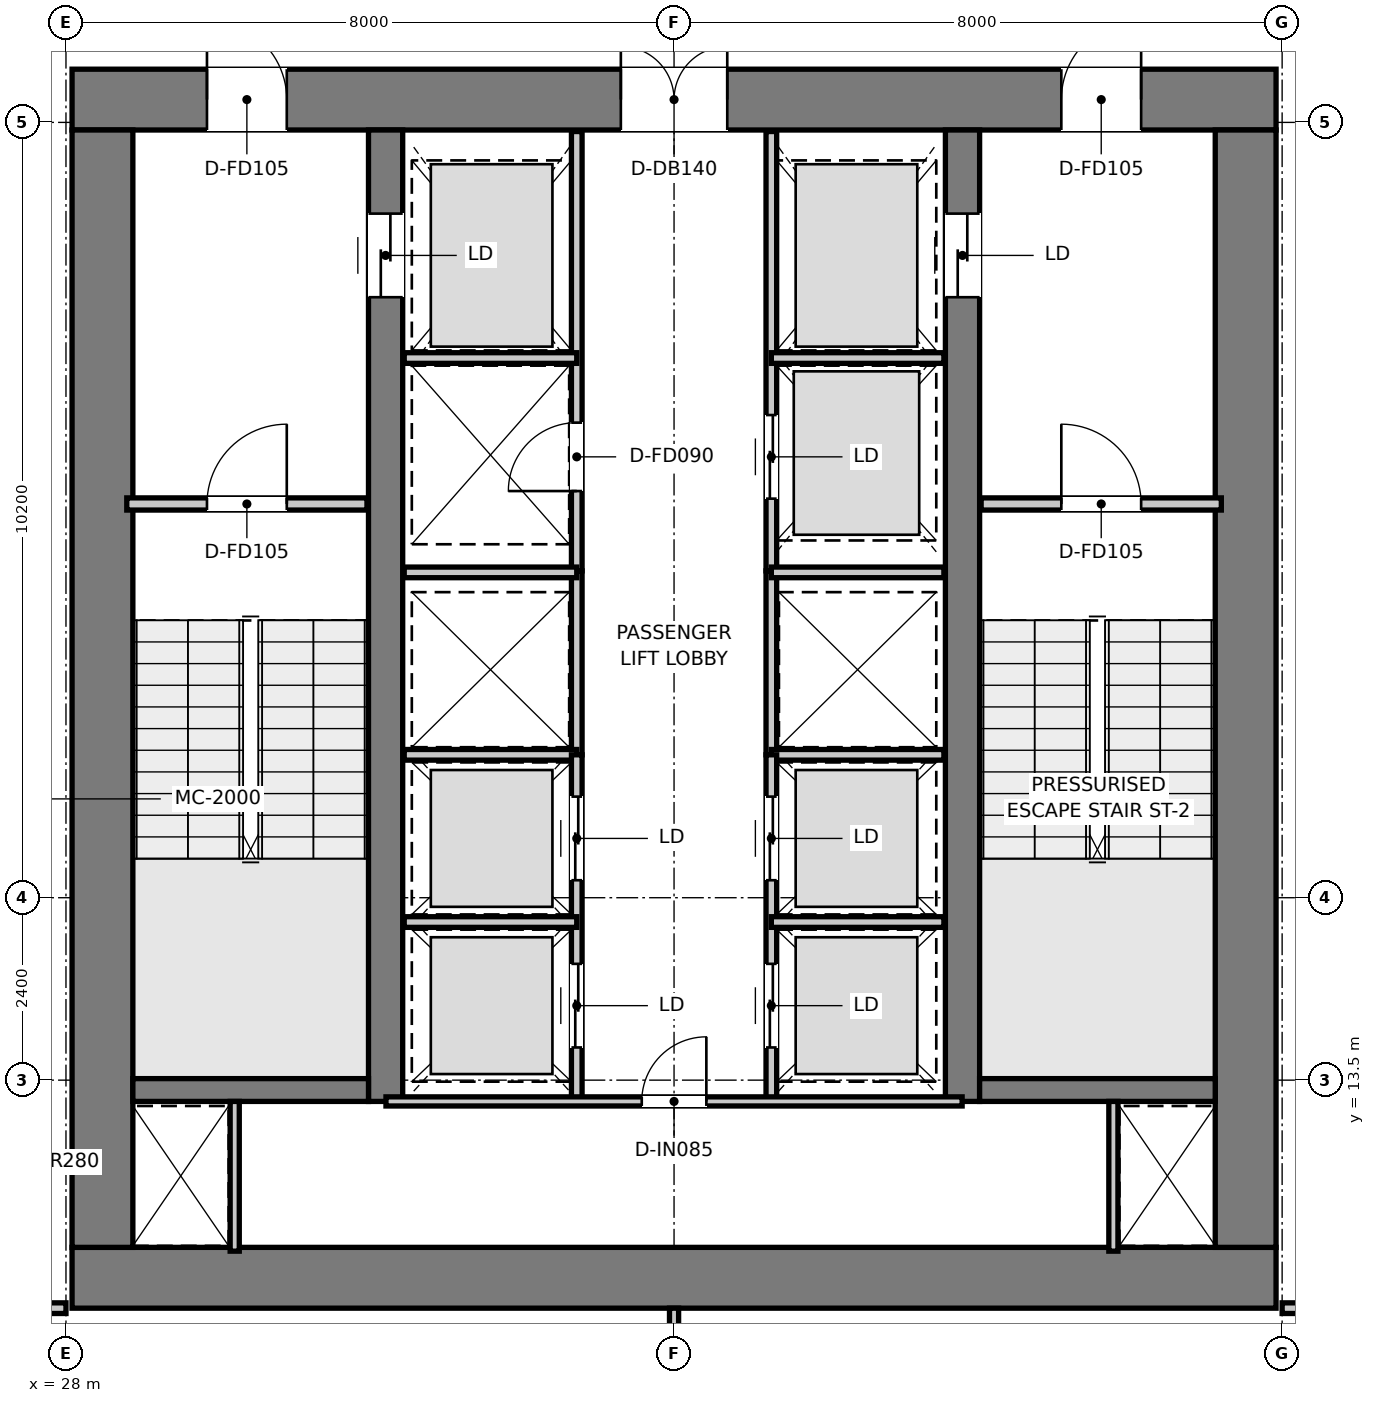
"""IFC4 building model, lengths in metres.
Left out: names, types, materials, properties, quantities, classifications, styles, units other than length and angle.
Written with IfcOpenShell. Run it as: python <this file> out.ifc"""

import sys

from ifc_helpers import new_model, si_unit, direction, frame, frame_2d, origin, place, context, subcontext, project, spatial, rectangle, extrude, element, fill, save


model = new_model("IFC4")
c1 = context("Model", 3, precision=1e-05, world=origin(), true_north=direction((0.0, 1.0)))
c2 = subcontext(c1, "Body", "Model", "MODEL_VIEW")
j1 = project(units=[si_unit("LENGTHUNIT", "METRE"), si_unit("PLANEANGLEUNIT", "RADIAN")], contexts=[c1])
p1 = place(None, origin())
s1 = spatial("IfcSite", under=j1, at=p1, CompositionType="ELEMENT")
p2 = place(p1, origin())
s2 = spatial("IfcBuilding", under=s1, at=p2, CompositionType="ELEMENT")
p3 = place(p2, frame((0.0, 0.0, 117.7)))
s3 = spatial("IfcBuildingStorey", under=s2, at=p3, CompositionType="ELEMENT", Elevation=117.7)
p4 = place(p3, frame((28.08, 10.9, 0.0), z_axis=(0.0, 0.0, 1.0), x_axis=(1.0, 0.0, 0.0)))
e1 = element("IfcWall", 1, at=p4, inside=s3, PredefinedType="SHEAR", context=c2, shape_type="SweptSolid", body=[
    extrude(rectangle(XDim=15.84, YDim=0.8, at=frame_2d((7.92, 0.0))), origin(), (0.0, 0.0, 1.0), 3.95),
])
p5 = place(p3, frame((28.08, 26.4, 0.0), z_axis=(0.0, 0.0, 1.0), x_axis=(1.0, 0.0, 0.0)))
e2 = element("IfcWall", 2, at=p5, inside=s3, PredefinedType="SHEAR", context=c2, shape_type="SweptSolid", body=[
    extrude(rectangle(XDim=15.84, YDim=0.8, at=frame_2d((7.92, 0.0))), origin(), (0.0, 0.0, 1.0), 3.95),
])
p6 = place(p5, frame((7.22, 0.0, 0.0)))
e3 = element("IfcOpeningElement", 3, at=p6, cuts=e2, PredefinedType="OPENING", context=c2, shape_type="SweptSolid", body=[
    extrude(rectangle(XDim=1.4, YDim=2.2, at=frame_2d((0.7, 1.1))), frame((0.0, 0.41, 0.0), z_axis=(0.0, -1.0, 0.0), x_axis=(1.0, 0.0, 0.0)), (0.0, 0.0, 1.0), 0.82),
])
p7 = place(p5, frame((1.775, 0.0, 0.0)))
e4 = element("IfcOpeningElement", 4, at=p7, cuts=e2, PredefinedType="OPENING", context=c2, shape_type="SweptSolid", body=[
    extrude(rectangle(XDim=1.05, YDim=2.1, at=frame_2d((0.525, 1.05))), frame((0.0, 0.41, 0.0), z_axis=(0.0, -1.0, 0.0), x_axis=(1.0, 0.0, 0.0)), (0.0, 0.0, 1.0), 0.82),
])
p8 = place(p5, frame((13.015, 0.0, 0.0)))
e5 = element("IfcOpeningElement", 5, at=p8, cuts=e2, PredefinedType="OPENING", context=c2, shape_type="SweptSolid", body=[
    extrude(rectangle(XDim=1.05, YDim=2.1, at=frame_2d((0.525, 1.05))), frame((0.0, 0.41, 0.0), z_axis=(0.0, -1.0, 0.0), x_axis=(1.0, 0.0, 0.0)), (0.0, 0.0, 1.0), 0.82),
])
for number, where, z_axis, x_axis in (
    (6, (28.48, 11.3, 0.0), (0.0, 0.0, 1.0), (0.0, 1.0, 0.0)),
    (7, (43.52, 11.3, 0.0), (0.0, 0.0, 1.0), (0.0, 1.0, 0.0)),
):
    element("IfcWall", number, at=place(p3, frame(where, z_axis=z_axis, x_axis=x_axis)), inside=s3, PredefinedType="SHEAR", context=c2, shape_type="SweptSolid", body=[
        extrude(rectangle(XDim=14.7, YDim=0.8, at=frame_2d((7.35, 0.0))), origin(), (0.0, 0.0, 1.0), 3.95),
    ])
p9 = place(p3, frame((32.205, 13.22, 0.0), z_axis=(0.0, 0.0, 1.0), x_axis=(0.0, 1.0, 0.0)))
e8 = element("IfcWall", 8, at=p9, inside=s3, PredefinedType="SHEAR", context=c2, shape_type="SweptSolid", body=[
    extrude(rectangle(XDim=12.78, YDim=0.45, at=frame_2d((6.39, 0.0))), origin(), (0.0, 0.0, 1.0), 3.95),
])
p10 = place(p9, frame((10.58, 0.0, 0.0)))
e9 = element("IfcOpeningElement", 9, at=p10, cuts=e8, PredefinedType="OPENING", context=c2, shape_type="SweptSolid", body=[
    extrude(rectangle(XDim=1.1, YDim=2.15, at=frame_2d((0.55, 1.075))), frame((0.0, 0.235, 0.0), z_axis=(0.0, -1.0, 0.0), x_axis=(1.0, 0.0, 0.0)), (0.0, 0.0, 1.0), 0.47),
])
p11 = place(p3, frame((39.795, 13.22, 0.0), z_axis=(0.0, 0.0, 1.0), x_axis=(0.0, 1.0, 0.0)))
e10 = element("IfcWall", 10, at=p11, inside=s3, PredefinedType="SHEAR", context=c2, shape_type="SweptSolid", body=[
    extrude(rectangle(XDim=12.78, YDim=0.45, at=frame_2d((6.39, 0.0))), origin(), (0.0, 0.0, 1.0), 3.95),
])
p12 = place(p11, frame((10.58, 0.0, 0.0)))
e11 = element("IfcOpeningElement", 11, at=p12, cuts=e10, PredefinedType="OPENING", context=c2, shape_type="SweptSolid", body=[
    extrude(rectangle(XDim=1.1, YDim=2.15, at=frame_2d((0.55, 1.075))), frame((0.0, 0.235, 0.0), z_axis=(0.0, -1.0, 0.0), x_axis=(1.0, 0.0, 0.0)), (0.0, 0.0, 1.0), 0.47),
])
for number, where, z_axis, x_axis in (
    (12, (28.88, 13.37, 0.0), (0.0, 0.0, 1.0), (1.0, 0.0, 0.0)),
    (13, (40.02, 13.37, 0.0), (0.0, 0.0, 1.0), (1.0, 0.0, 0.0)),
):
    element("IfcWall", number, at=place(p3, frame(where, z_axis=z_axis, x_axis=x_axis)), inside=s3, PredefinedType="SHEAR", context=c2, shape_type="SweptSolid", body=[
        extrude(rectangle(XDim=3.1, YDim=0.3, at=frame_2d((1.55, 0.0))), origin(), (0.0, 0.0, 1.0), 3.95),
    ])
p13 = place(p3, frame((28.8, 21.08, 0.0), z_axis=(0.0, 0.0, 1.0), x_axis=(1.0, 0.0, 0.0)))
e14 = element("IfcWall", 14, at=p13, inside=s3, PredefinedType="PARTITIONING", context=c2, shape_type="SweptSolid", body=[
    extrude(rectangle(XDim=3.16, YDim=0.16, at=frame_2d((1.58, 0.0))), origin(), (0.0, 0.0, 1.0), 3.67),
])
p14 = place(p13, frame((1.055, 0.0, 0.0)))
e15 = element("IfcOpeningElement", 15, at=p14, cuts=e14, PredefinedType="OPENING", context=c2, shape_type="SweptSolid", body=[
    extrude(rectangle(XDim=1.05, YDim=2.1, at=frame_2d((0.525, 1.05))), frame((0.0, 0.09, 0.0), z_axis=(0.0, -1.0, 0.0), x_axis=(1.0, 0.0, 0.0)), (0.0, 0.0, 1.0), 0.18),
])
p15 = place(p3, frame((40.04, 21.08, 0.0), z_axis=(0.0, 0.0, 1.0), x_axis=(1.0, 0.0, 0.0)))
e16 = element("IfcWall", 16, at=p15, inside=s3, PredefinedType="PARTITIONING", context=c2, shape_type="SweptSolid", body=[
    extrude(rectangle(XDim=3.16, YDim=0.16, at=frame_2d((1.58, 0.0))), origin(), (0.0, 0.0, 1.0), 3.67),
])
p16 = place(p15, frame((1.055, 0.0, 0.0)))
e17 = element("IfcOpeningElement", 17, at=p16, cuts=e16, PredefinedType="OPENING", context=c2, shape_type="SweptSolid", body=[
    extrude(rectangle(XDim=1.05, YDim=2.1, at=frame_2d((0.525, 1.05))), frame((0.0, 0.09, 0.0), z_axis=(0.0, -1.0, 0.0), x_axis=(1.0, 0.0, 0.0)), (0.0, 0.0, 1.0), 0.18),
])
p17 = place(p3, frame((34.72, 20.2, 0.0), z_axis=(0.0, 0.0, 1.0), x_axis=(0.0, 1.0, 0.0)))
e18 = element("IfcWall", 18, at=p17, inside=s3, PredefinedType="PARTITIONING", context=c2, shape_type="SweptSolid", body=[
    extrude(rectangle(XDim=5.78, YDim=0.14, at=frame_2d((2.89, 0.0))), origin(), (0.0, 0.0, 1.0), 2.67),
])
p18 = place(p17, frame((1.05, 0.0, 0.0)))
e19 = element("IfcOpeningElement", 19, at=p18, cuts=e18, PredefinedType="OPENING", context=c2, shape_type="SweptSolid", body=[
    extrude(rectangle(XDim=0.9, YDim=2.1, at=frame_2d((0.45, 1.05))), frame((0.0, 0.08, 0.0), z_axis=(0.0, -1.0, 0.0), x_axis=(1.0, 0.0, 0.0)), (0.0, 0.0, 1.0), 0.16),
])
p19 = place(p3, frame((37.28, 20.2, 0.0), z_axis=(0.0, 0.0, 1.0), x_axis=(0.0, 1.0, 0.0)))
e20 = element("IfcWall", 20, at=p19, inside=s3, PredefinedType="PARTITIONING", context=c2, shape_type="SweptSolid", body=[
    extrude(rectangle(XDim=5.78, YDim=0.14, at=frame_2d((2.89, 0.0))), origin(), (0.0, 0.0, 1.0), 2.67),
])
p20 = place(p19, frame((0.95, 0.0, 0.0)))
e21 = element("IfcOpeningElement", 21, at=p20, cuts=e20, PredefinedType="OPENING", context=c2, shape_type="SweptSolid", body=[
    extrude(rectangle(XDim=1.1, YDim=2.15, at=frame_2d((0.55, 1.075))), frame((0.0, 0.08, 0.0), z_axis=(0.0, -1.0, 0.0), x_axis=(1.0, 0.0, 0.0)), (0.0, 0.0, 1.0), 0.16),
])
for number, where, z_axis, x_axis in (
    (22, (32.45, 23.0, 0.0), (0.0, 0.0, 1.0), (1.0, 0.0, 0.0)),
    (23, (37.28, 23.0, 0.0), (0.0, 0.0, 1.0), (1.0, 0.0, 0.0)),
):
    element("IfcWall", number, at=place(p3, frame(where, z_axis=z_axis, x_axis=x_axis)), inside=s3, PredefinedType="PARTITIONING", context=c2, shape_type="SweptSolid", body=[
        extrude(rectangle(XDim=2.27, YDim=0.14, at=frame_2d((1.135, 0.0))), origin(), (0.0, 0.0, 1.0), 2.67),
    ])
for number, where, z_axis, x_axis in (
    (24, (34.72, 17.78, 0.0), (0.0, 0.0, 1.0), (0.0, 1.0, 0.0)),
    (25, (37.28, 17.78, 0.0), (0.0, 0.0, 1.0), (0.0, 1.0, 0.0)),
):
    element("IfcWall", number, at=place(p3, frame(where, z_axis=z_axis, x_axis=x_axis)), inside=s3, PredefinedType="PARTITIONING", context=c2, shape_type="SweptSolid", body=[
        extrude(rectangle(XDim=2.42, YDim=0.14, at=frame_2d((1.21, 0.0))), origin(), (0.0, 0.0, 1.0), 3.67),
    ])
for number, where, z_axis, x_axis in (
    (26, (32.45, 17.78, 0.0), (0.0, 0.0, 1.0), (1.0, 0.0, 0.0)),
    (27, (32.45, 20.18, 0.0), (0.0, 0.0, 1.0), (1.0, 0.0, 0.0)),
    (28, (37.28, 17.78, 0.0), (0.0, 0.0, 1.0), (1.0, 0.0, 0.0)),
    (29, (37.28, 20.18, 0.0), (0.0, 0.0, 1.0), (1.0, 0.0, 0.0)),
):
    element("IfcWall", number, at=place(p3, frame(where, z_axis=z_axis, x_axis=x_axis)), inside=s3, PredefinedType="PARTITIONING", context=c2, shape_type="SweptSolid", body=[
        extrude(rectangle(XDim=2.27, YDim=0.14, at=frame_2d((1.135, 0.0))), origin(), (0.0, 0.0, 1.0), 3.67),
    ])
p21 = place(p3, frame((34.72, 13.22, 0.0), z_axis=(0.0, 0.0, 1.0), x_axis=(0.0, 1.0, 0.0)))
e30 = element("IfcWall", 30, at=p21, inside=s3, PredefinedType="PARTITIONING", context=c2, shape_type="SweptSolid", body=[
    extrude(rectangle(XDim=4.56, YDim=0.14, at=frame_2d((2.28, 0.0))), origin(), (0.0, 0.0, 1.0), 3.67),
])
p22 = place(p21, frame((0.71, 0.0, 0.0)))
e31 = element("IfcOpeningElement", 31, at=p22, cuts=e30, PredefinedType="OPENING", context=c2, shape_type="SweptSolid", body=[
    extrude(rectangle(XDim=1.1, YDim=2.15, at=frame_2d((0.55, 1.075))), frame((0.0, 0.08, 0.0), z_axis=(0.0, -1.0, 0.0), x_axis=(1.0, 0.0, 0.0)), (0.0, 0.0, 1.0), 0.16),
])
p23 = place(p21, frame((2.91, 0.0, 0.0)))
e32 = element("IfcOpeningElement", 32, at=p23, cuts=e30, PredefinedType="OPENING", context=c2, shape_type="SweptSolid", body=[
    extrude(rectangle(XDim=1.1, YDim=2.15, at=frame_2d((0.55, 1.075))), frame((0.0, 0.08, 0.0), z_axis=(0.0, -1.0, 0.0), x_axis=(1.0, 0.0, 0.0)), (0.0, 0.0, 1.0), 0.16),
])
p24 = place(p3, frame((32.45, 15.58, 0.0), z_axis=(0.0, 0.0, 1.0), x_axis=(1.0, 0.0, 0.0)))
e33 = element("IfcWall", 33, at=p24, inside=s3, PredefinedType="PARTITIONING", context=c2, shape_type="SweptSolid", body=[
    extrude(rectangle(XDim=2.27, YDim=0.14, at=frame_2d((1.135, 0.0))), origin(), (0.0, 0.0, 1.0), 3.67),
])
p25 = place(p3, frame((37.28, 13.22, 0.0), z_axis=(0.0, 0.0, 1.0), x_axis=(0.0, 1.0, 0.0)))
e34 = element("IfcWall", 34, at=p25, inside=s3, PredefinedType="PARTITIONING", context=c2, shape_type="SweptSolid", body=[
    extrude(rectangle(XDim=4.56, YDim=0.14, at=frame_2d((2.28, 0.0))), origin(), (0.0, 0.0, 1.0), 3.67),
])
p26 = place(p25, frame((0.71, 0.0, 0.0)))
e35 = element("IfcOpeningElement", 35, at=p26, cuts=e34, PredefinedType="OPENING", context=c2, shape_type="SweptSolid", body=[
    extrude(rectangle(XDim=1.1, YDim=2.15, at=frame_2d((0.55, 1.075))), frame((0.0, 0.08, 0.0), z_axis=(0.0, -1.0, 0.0), x_axis=(1.0, 0.0, 0.0)), (0.0, 0.0, 1.0), 0.16),
])
p27 = place(p25, frame((2.91, 0.0, 0.0)))
e36 = element("IfcOpeningElement", 36, at=p27, cuts=e34, PredefinedType="OPENING", context=c2, shape_type="SweptSolid", body=[
    extrude(rectangle(XDim=1.1, YDim=2.15, at=frame_2d((0.55, 1.075))), frame((0.0, 0.08, 0.0), z_axis=(0.0, -1.0, 0.0), x_axis=(1.0, 0.0, 0.0)), (0.0, 0.0, 1.0), 0.16),
])
p28 = place(p3, frame((37.28, 15.58, 0.0), z_axis=(0.0, 0.0, 1.0), x_axis=(1.0, 0.0, 0.0)))
e37 = element("IfcWall", 37, at=p28, inside=s3, PredefinedType="PARTITIONING", context=c2, shape_type="SweptSolid", body=[
    extrude(rectangle(XDim=2.27, YDim=0.14, at=frame_2d((1.135, 0.0))), origin(), (0.0, 0.0, 1.0), 3.67),
])
for number, where, z_axis, x_axis in (
    (38, (30.22, 11.25, 0.0), (0.0, 0.0, 1.0), (0.0, 1.0, 0.0)),
    (39, (41.78, 11.25, 0.0), (0.0, 0.0, 1.0), (0.0, 1.0, 0.0)),
):
    element("IfcWall", number, at=place(p3, frame(where, z_axis=z_axis, x_axis=x_axis)), inside=s3, PredefinedType="PARTITIONING", context=c2, shape_type="SweptSolid", body=[
        extrude(rectangle(XDim=1.97, YDim=0.12, at=frame_2d((0.985, 0.0))), origin(), (0.0, 0.0, 1.0), 3.67),
    ])
p29 = place(p3, frame((32.21, 13.22, 0.0), z_axis=(0.0, 0.0, 1.0), x_axis=(1.0, 0.0, 0.0)))
e40 = element("IfcWall", 40, at=p29, inside=s3, PredefinedType="PARTITIONING", context=c2, shape_type="SweptSolid", body=[
    extrude(rectangle(XDim=7.58, YDim=0.12, at=frame_2d((3.79, 0.0))), origin(), (0.0, 0.0, 1.0), 3.67),
])
p30 = place(p29, frame((3.365, 0.0, 0.0)))
e41 = element("IfcOpeningElement", 41, at=p30, cuts=e40, PredefinedType="OPENING", context=c2, shape_type="SweptSolid", body=[
    extrude(rectangle(XDim=0.85, YDim=2.1, at=frame_2d((0.425, 1.05))), frame((0.0, 0.07, 0.0), z_axis=(0.0, -1.0, 0.0), x_axis=(1.0, 0.0, 0.0)), (0.0, 0.0, 1.0), 0.14),
])
p31 = place(p3, frame((26.32, 10.5, 0.0), z_axis=(0.0, 0.0, 1.0), x_axis=(1.0, 0.0, 0.0)))
e42 = element("IfcWall", 42, at=p31, inside=s3, PredefinedType="PARTITIONING", context=c2, shape_type="SweptSolid", body=[
    extrude(rectangle(XDim=1.68, YDim=0.14, at=frame_2d((0.84, 0.0))), origin(), (0.0, 0.0, 1.0), 3.67),
])
p32 = place(p31, frame((0.445, 0.0, 0.0)))
e43 = element("IfcOpeningElement", 43, at=p32, cuts=e42, PredefinedType="OPENING", context=c2, shape_type="SweptSolid", body=[
    extrude(rectangle(XDim=0.85, YDim=2.1, at=frame_2d((0.425, 1.05))), frame((0.0, 0.08, 0.0), z_axis=(0.0, -1.0, 0.0), x_axis=(1.0, 0.0, 0.0)), (0.0, 0.0, 1.0), 0.16),
])
p33 = place(p3, frame((44.0, 10.5, 0.0), z_axis=(0.0, 0.0, 1.0), x_axis=(1.0, 0.0, 0.0)))
e44 = element("IfcWall", 44, at=p33, inside=s3, PredefinedType="PARTITIONING", context=c2, shape_type="SweptSolid", body=[
    extrude(rectangle(XDim=1.68, YDim=0.14, at=frame_2d((0.84, 0.0))), origin(), (0.0, 0.0, 1.0), 3.67),
])
p34 = place(p33, frame((0.385, 0.0, 0.0)))
e45 = element("IfcOpeningElement", 45, at=p34, cuts=e44, PredefinedType="OPENING", context=c2, shape_type="SweptSolid", body=[
    extrude(rectangle(XDim=0.85, YDim=2.1, at=frame_2d((0.425, 1.05))), frame((0.0, 0.08, 0.0), z_axis=(0.0, -1.0, 0.0), x_axis=(1.0, 0.0, 0.0)), (0.0, 0.0, 1.0), 0.16),
])
p35 = place(p3, frame((36.0, 2.028, 0.0), z_axis=(0.0, 0.0, 1.0), x_axis=(0.0, 1.0, 0.0)))
e46 = element("IfcWall", 46, at=p35, inside=s3, PredefinedType="PARTITIONING", context=c2, shape_type="SweptSolid", body=[
    extrude(rectangle(XDim=8.472, YDim=0.12, at=frame_2d((4.236, 0.0))), origin(), (0.0, 0.0, 1.0), 3.67),
])
p36 = place(p14, origin())
e47 = element("IfcDoor", 47, at=p36, inside=s3, OperationType="SINGLE_SWING_RIGHT", PredefinedType="DOOR", context=c2, shape_type="SweptSolid", body=[
    extrude(rectangle(XDim=1.05, YDim=2.1, at=frame_2d((0.525, 1.05))), frame((0.0, 0.025, 0.0), z_axis=(0.0, -1.0, 0.0), x_axis=(1.0, 0.0, 0.0)), (0.0, 0.0, 1.0), 0.05),
])
fill(e15, e47)
p37 = place(p16, origin())
e48 = element("IfcDoor", 48, at=p37, inside=s3, OperationType="SINGLE_SWING_LEFT", PredefinedType="DOOR", context=c2, shape_type="SweptSolid", body=[
    extrude(rectangle(XDim=1.05, YDim=2.1, at=frame_2d((0.525, 1.05))), frame((0.0, 0.025, 0.0), z_axis=(0.0, -1.0, 0.0), x_axis=(1.0, 0.0, 0.0)), (0.0, 0.0, 1.0), 0.05),
])
fill(e17, e48)
p38 = place(p6, origin())
e49 = element("IfcDoor", 49, at=p38, inside=s3, OperationType="DOUBLE_DOOR_SINGLE_SWING", PredefinedType="DOOR", context=c2, shape_type="SweptSolid", body=[
    extrude(rectangle(XDim=1.4, YDim=2.2, at=frame_2d((0.7, 1.1))), frame((0.0, 0.025, 0.0), z_axis=(0.0, -1.0, 0.0), x_axis=(1.0, 0.0, 0.0)), (0.0, 0.0, 1.0), 0.05),
])
fill(e3, e49)
p39 = place(p7, origin())
e50 = element("IfcDoor", 50, at=p39, inside=s3, OperationType="SINGLE_SWING_LEFT", PredefinedType="DOOR", context=c2, shape_type="SweptSolid", body=[
    extrude(rectangle(XDim=1.05, YDim=2.1, at=frame_2d((0.525, 1.05))), frame((0.0, 0.025, 0.0), z_axis=(0.0, -1.0, 0.0), x_axis=(1.0, 0.0, 0.0)), (0.0, 0.0, 1.0), 0.05),
])
fill(e4, e50)
p40 = place(p8, origin())
e51 = element("IfcDoor", 51, at=p40, inside=s3, OperationType="SINGLE_SWING_RIGHT", PredefinedType="DOOR", context=c2, shape_type="SweptSolid", body=[
    extrude(rectangle(XDim=1.05, YDim=2.1, at=frame_2d((0.525, 1.05))), frame((0.0, 0.025, 0.0), z_axis=(0.0, -1.0, 0.0), x_axis=(1.0, 0.0, 0.0)), (0.0, 0.0, 1.0), 0.05),
])
fill(e5, e51)
p41 = place(p10, origin())
e52 = element("IfcDoor", 52, at=p41, inside=s3, OperationType="DOUBLE_DOOR_SLIDING", PredefinedType="DOOR", context=c2, shape_type="SweptSolid", body=[
    extrude(rectangle(XDim=1.1, YDim=2.15, at=frame_2d((0.55, 1.075))), frame((0.0, 0.025, 0.0), z_axis=(0.0, -1.0, 0.0), x_axis=(1.0, 0.0, 0.0)), (0.0, 0.0, 1.0), 0.05),
])
fill(e9, e52)
p42 = place(p12, origin())
e53 = element("IfcDoor", 53, at=p42, inside=s3, OperationType="DOUBLE_DOOR_SLIDING", PredefinedType="DOOR", context=c2, shape_type="SweptSolid", body=[
    extrude(rectangle(XDim=1.1, YDim=2.15, at=frame_2d((0.55, 1.075))), frame((0.0, 0.025, 0.0), z_axis=(0.0, -1.0, 0.0), x_axis=(1.0, 0.0, 0.0)), (0.0, 0.0, 1.0), 0.05),
])
fill(e11, e53)
p43 = place(p18, origin())
e54 = element("IfcDoor", 54, at=p43, inside=s3, OperationType="SINGLE_SWING_LEFT", PredefinedType="DOOR", context=c2, shape_type="SweptSolid", body=[
    extrude(rectangle(XDim=0.9, YDim=2.1, at=frame_2d((0.45, 1.05))), frame((0.0, 0.025, 0.0), z_axis=(0.0, -1.0, 0.0), x_axis=(1.0, 0.0, 0.0)), (0.0, 0.0, 1.0), 0.05),
])
fill(e19, e54)
p44 = place(p20, origin())
e55 = element("IfcDoor", 55, at=p44, inside=s3, OperationType="DOUBLE_DOOR_SLIDING", PredefinedType="DOOR", context=c2, shape_type="SweptSolid", body=[
    extrude(rectangle(XDim=1.1, YDim=2.15, at=frame_2d((0.55, 1.075))), frame((0.0, 0.025, 0.0), z_axis=(0.0, -1.0, 0.0), x_axis=(1.0, 0.0, 0.0)), (0.0, 0.0, 1.0), 0.05),
])
fill(e21, e55)
p45 = place(p22, origin())
e56 = element("IfcDoor", 56, at=p45, inside=s3, OperationType="DOUBLE_DOOR_SLIDING", PredefinedType="DOOR", context=c2, shape_type="SweptSolid", body=[
    extrude(rectangle(XDim=1.1, YDim=2.15, at=frame_2d((0.55, 1.075))), frame((0.0, 0.025, 0.0), z_axis=(0.0, -1.0, 0.0), x_axis=(1.0, 0.0, 0.0)), (0.0, 0.0, 1.0), 0.05),
])
fill(e31, e56)
p46 = place(p23, origin())
e57 = element("IfcDoor", 57, at=p46, inside=s3, OperationType="DOUBLE_DOOR_SLIDING", PredefinedType="DOOR", context=c2, shape_type="SweptSolid", body=[
    extrude(rectangle(XDim=1.1, YDim=2.15, at=frame_2d((0.55, 1.075))), frame((0.0, 0.025, 0.0), z_axis=(0.0, -1.0, 0.0), x_axis=(1.0, 0.0, 0.0)), (0.0, 0.0, 1.0), 0.05),
])
fill(e32, e57)
p47 = place(p26, origin())
e58 = element("IfcDoor", 58, at=p47, inside=s3, OperationType="DOUBLE_DOOR_SLIDING", PredefinedType="DOOR", context=c2, shape_type="SweptSolid", body=[
    extrude(rectangle(XDim=1.1, YDim=2.15, at=frame_2d((0.55, 1.075))), frame((0.0, 0.025, 0.0), z_axis=(0.0, -1.0, 0.0), x_axis=(1.0, 0.0, 0.0)), (0.0, 0.0, 1.0), 0.05),
])
fill(e35, e58)
p48 = place(p27, origin())
e59 = element("IfcDoor", 59, at=p48, inside=s3, OperationType="DOUBLE_DOOR_SLIDING", PredefinedType="DOOR", context=c2, shape_type="SweptSolid", body=[
    extrude(rectangle(XDim=1.1, YDim=2.15, at=frame_2d((0.55, 1.075))), frame((0.0, 0.025, 0.0), z_axis=(0.0, -1.0, 0.0), x_axis=(1.0, 0.0, 0.0)), (0.0, 0.0, 1.0), 0.05),
])
fill(e36, e59)
p49 = place(p30, origin())
e60 = element("IfcDoor", 60, at=p49, inside=s3, OperationType="SINGLE_SWING_RIGHT", PredefinedType="DOOR", context=c2, shape_type="SweptSolid", body=[
    extrude(rectangle(XDim=0.85, YDim=2.1, at=frame_2d((0.425, 1.05))), frame((0.0, 0.025, 0.0), z_axis=(0.0, -1.0, 0.0), x_axis=(1.0, 0.0, 0.0)), (0.0, 0.0, 1.0), 0.05),
])
fill(e41, e60)
save(model, sys.argv[1])
